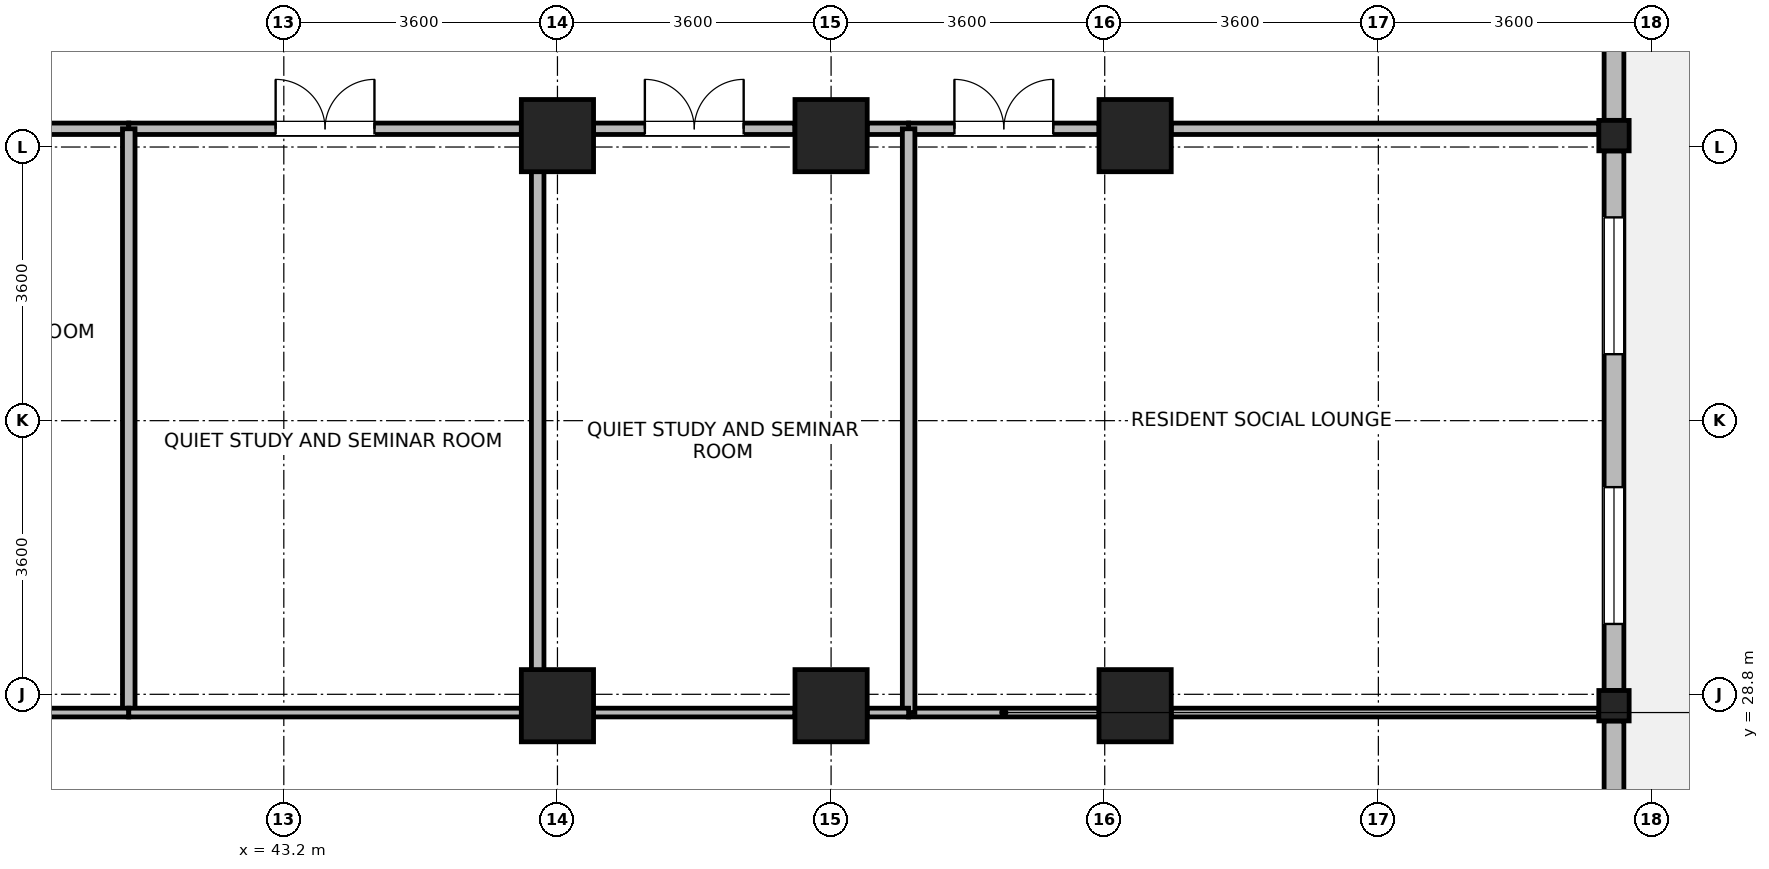
"""IFC4 building model, lengths in metres.
Left out: names, types, materials, properties, quantities, classifications, styles, units other than length and angle.
Written with IfcOpenShell. Run it as: python <this file> out.ifc"""

import sys

from ifc_helpers import new_model, si_unit, direction, frame, frame_2d, origin, origin_2d, place, context, subcontext, project, spatial, rectangle, i_section, extrude, source, transform, mapped, element, fill, save


model = new_model("IFC4")
c1 = context("Model", 3, precision=1e-05, world=origin(), true_north=direction((0.0, 1.0)))
c2 = subcontext(c1, "Body", "Model", "MODEL_VIEW")
j1 = project(units=[si_unit("LENGTHUNIT", "METRE"), si_unit("PLANEANGLEUNIT", "RADIAN")], contexts=[c1])
p1 = place(None, origin())
s1 = spatial("IfcSite", under=j1, at=p1, CompositionType="ELEMENT")
p2 = place(p1, origin())
s2 = spatial("IfcBuilding", under=s1, at=p2, CompositionType="ELEMENT")
p3 = place(p2, frame((0.0, 0.0, 216.6)))
s3 = spatial("IfcBuildingStorey", under=s2, at=p3, CompositionType="ELEMENT", Elevation=216.6)
m1 = source(origin(), c2, "Body", "SweptSolid", [
    extrude(rectangle(XDim=0.95, YDim=0.95, at=origin_2d()), origin(), (0.0, 0.0, 1.0), 3.7),
])
for number, where, z_axis, x_axis in (
    (1, (46.8, 28.65, 0.0), (0.0, 0.0, 1.0), (1.0, 0.0, 0.0)),
    (2, (46.8, 36.15, 0.0), (0.0, 0.0, 1.0), (1.0, 0.0, 0.0)),
    (3, (50.4, 28.65, 0.0), (0.0, 0.0, 1.0), (1.0, 0.0, 0.0)),
    (4, (50.4, 36.15, 0.0), (0.0, 0.0, 1.0), (1.0, 0.0, 0.0)),
    (5, (54.4, 28.65, 0.0), (0.0, 0.0, 1.0), (1.0, 0.0, 0.0)),
    (6, (54.4, 36.15, 0.0), (0.0, 0.0, 1.0), (1.0, 0.0, 0.0)),
):
    element("IfcColumn", number, at=place(p3, frame(where, z_axis=z_axis, x_axis=x_axis)), inside=s3, PredefinedType="COLUMN", context=c2, shape_type="MappedRepresentation", body=[
        mapped(m1, transform((0.0, 0.0, 0.0), x_axis=(1.0, 0.0, 0.0), y_axis=(0.0, 1.0, 0.0), z_axis=(0.0, 0.0, 1.0), scale=1.0)),
    ])
m2 = source(origin(), c2, "Body", "SweptSolid", [
    extrude(i_section(OverallWidth=0.399, OverallDepth=0.4, WebThickness=0.017, FlangeThickness=0.023, FilletRadius=0.015, at=origin_2d()), origin(), (0.0, 0.0, 1.0), 3.7),
])
for number, where, z_axis, x_axis in (
    (7, (60.7, 28.65, 0.0), (0.0, 0.0, 1.0), (1.0, 0.0, 0.0)),
    (8, (60.7, 36.15, 0.0), (0.0, 0.0, 1.0), (1.0, 0.0, 0.0)),
):
    element("IfcColumn", number, at=place(p3, frame(where, z_axis=z_axis, x_axis=x_axis)), inside=s3, PredefinedType="COLUMN", context=c2, shape_type="MappedRepresentation", body=[
        mapped(m2, transform((0.0, 0.0, 0.0), x_axis=(1.0, 0.0, 0.0), y_axis=(0.0, 1.0, 0.0), z_axis=(0.0, 0.0, 1.0), scale=1.0)),
    ])
p4 = place(p3, frame((60.7, 28.449, 0.0), z_axis=(0.0, 0.0, 1.0), x_axis=(0.0, -1.0, 0.0)))
e9 = element("IfcWall", 9, at=p4, inside=s3, PredefinedType="STANDARD", context=c2, shape_type="SweptSolid", body=[
    extrude(rectangle(XDim=6.648, YDim=0.26, at=frame_2d((3.324, 0.0))), origin(), (0.0, 0.0, 1.0), 3.05),
])
p5 = place(p4, frame((4.086, 0.0, 0.85)))
e10 = element("IfcOpeningElement", 10, at=p5, cuts=e9, PredefinedType="OPENING", context=c2, shape_type="SweptSolid", body=[
    extrude(rectangle(XDim=1.8, YDim=1.85, at=frame_2d((0.9, 0.925))), frame((0.0, 0.14, 0.0), z_axis=(0.0, -1.0, 0.0), x_axis=(1.0, 0.0, 0.0)), (0.0, 0.0, 1.0), 0.28),
])
p6 = place(p4, frame((2.317, 0.0, 0.85)))
e11 = element("IfcOpeningElement", 11, at=p6, cuts=e9, PredefinedType="OPENING", context=c2, shape_type="SweptSolid", body=[
    extrude(rectangle(XDim=0.95, YDim=1.75, at=frame_2d((0.475, 0.875))), frame((0.0, 0.14, 0.0), z_axis=(0.0, -1.0, 0.0), x_axis=(1.0, 0.0, 0.0)), (0.0, 0.0, 1.0), 0.28),
])
p7 = place(p3, frame((60.7, 35.949, 0.0), z_axis=(0.0, 0.0, 1.0), x_axis=(0.0, -1.0, 0.0)))
e12 = element("IfcWall", 12, at=p7, inside=s3, PredefinedType="STANDARD", context=c2, shape_type="SweptSolid", body=[
    extrude(rectangle(XDim=7.098, YDim=0.26, at=frame_2d((3.549, 0.0))), origin(), (0.0, 0.0, 1.0), 3.05),
])
p8 = place(p7, frame((0.875, 0.0, 0.85)))
e13 = element("IfcOpeningElement", 13, at=p8, cuts=e12, PredefinedType="OPENING", context=c2, shape_type="SweptSolid", body=[
    extrude(rectangle(XDim=1.8, YDim=1.85, at=frame_2d((0.9, 0.925))), frame((0.0, 0.14, 0.0), z_axis=(0.0, -1.0, 0.0), x_axis=(1.0, 0.0, 0.0)), (0.0, 0.0, 1.0), 0.28),
])
p9 = place(p7, frame((4.424, 0.0, 0.85)))
e14 = element("IfcOpeningElement", 14, at=p9, cuts=e12, PredefinedType="OPENING", context=c2, shape_type="SweptSolid", body=[
    extrude(rectangle(XDim=1.8, YDim=1.85, at=frame_2d((0.9, 0.925))), frame((0.0, 0.14, 0.0), z_axis=(0.0, -1.0, 0.0), x_axis=(1.0, 0.0, 0.0)), (0.0, 0.0, 1.0), 0.28),
])
p10 = place(p3, frame((60.7, 43.33, 0.0), z_axis=(0.0, 0.0, 1.0), x_axis=(0.0, -1.0, 0.0)))
e15 = element("IfcWall", 15, at=p10, inside=s3, PredefinedType="STANDARD", context=c2, shape_type="SweptSolid", body=[
    extrude(rectangle(XDim=6.979, YDim=0.26, at=frame_2d((3.49, 0.0))), origin(), (0.0, 0.0, 1.0), 3.45),
])
p11 = place(p10, frame((0.845, 0.0, 0.85)))
e16 = element("IfcOpeningElement", 16, at=p11, cuts=e15, PredefinedType="OPENING", context=c2, shape_type="SweptSolid", body=[
    extrude(rectangle(XDim=1.8, YDim=1.85, at=frame_2d((0.9, 0.925))), frame((0.0, 0.14, 0.0), z_axis=(0.0, -1.0, 0.0), x_axis=(1.0, 0.0, 0.0)), (0.0, 0.0, 1.0), 0.28),
])
p12 = place(p10, frame((3.014, 0.0, 0.85)))
e17 = element("IfcOpeningElement", 17, at=p12, cuts=e15, PredefinedType="OPENING", context=c2, shape_type="SweptSolid", body=[
    extrude(rectangle(XDim=0.95, YDim=1.75, at=frame_2d((0.475, 0.875))), frame((0.0, 0.14, 0.0), z_axis=(0.0, -1.0, 0.0), x_axis=(1.0, 0.0, 0.0)), (0.0, 0.0, 1.0), 0.28),
])
p13 = place(p3, frame((51.42, 36.24, 0.0), z_axis=(0.0, 0.0, 1.0), x_axis=(1.0, 0.0, 0.0)))
e18 = element("IfcWall", 18, at=p13, inside=s3, PredefinedType="PARTITIONING", context=c2, shape_type="SweptSolid", body=[
    extrude(rectangle(XDim=2.505, YDim=0.15, at=frame_2d((1.252, 0.0))), origin(), (0.0, 0.0, 1.0), 2.9),
])
p14 = place(p13, frame((0.603, 0.0, 0.0)))
e19 = element("IfcOpeningElement", 19, at=p14, cuts=e18, PredefinedType="OPENING", context=c2, shape_type="SweptSolid", body=[
    extrude(rectangle(XDim=1.3, YDim=2.12, at=frame_2d((0.65, 1.06))), frame((0.0, 0.085, 0.0), z_axis=(0.0, -1.0, 0.0), x_axis=(1.0, 0.0, 0.0)), (0.0, 0.0, 1.0), 0.17),
])
p15 = place(p3, frame((54.875, 36.24, 0.0), z_axis=(0.0, 0.0, 1.0), x_axis=(1.0, 0.0, 0.0)))
e20 = element("IfcWall", 20, at=p15, inside=s3, PredefinedType="PARTITIONING", context=c2, shape_type="SweptSolid", body=[
    extrude(rectangle(XDim=5.625, YDim=0.15, at=frame_2d((2.813, 0.0))), origin(), (0.0, 0.0, 1.0), 2.9),
])
p16 = place(p3, frame((36.475, 36.24, 0.0), z_axis=(0.0, 0.0, 1.0), x_axis=(1.0, 0.0, 0.0)))
e21 = element("IfcWall", 21, at=p16, inside=s3, PredefinedType="PARTITIONING", context=c2, shape_type="SweptSolid", body=[
    extrude(rectangle(XDim=4.685, YDim=0.15, at=frame_2d((2.342, 0.0))), origin(), (0.0, 0.0, 1.0), 2.9),
])
p17 = place(p3, frame((41.16, 36.24, 0.0), z_axis=(0.0, 0.0, 1.0), x_axis=(1.0, 0.0, 0.0)))
e22 = element("IfcWall", 22, at=p17, inside=s3, PredefinedType="PARTITIONING", context=c2, shape_type="SweptSolid", body=[
    extrude(rectangle(XDim=5.165, YDim=0.15, at=frame_2d((2.583, 0.0))), origin(), (0.0, 0.0, 1.0), 2.9),
])
p18 = place(p17, frame((1.933, 0.0, 0.0)))
e23 = element("IfcOpeningElement", 23, at=p18, cuts=e22, PredefinedType="OPENING", context=c2, shape_type="SweptSolid", body=[
    extrude(rectangle(XDim=1.3, YDim=2.12, at=frame_2d((0.65, 1.06))), frame((0.0, 0.085, 0.0), z_axis=(0.0, -1.0, 0.0), x_axis=(1.0, 0.0, 0.0)), (0.0, 0.0, 1.0), 0.17),
])
p19 = place(p3, frame((47.275, 36.24, 0.0), z_axis=(0.0, 0.0, 1.0), x_axis=(1.0, 0.0, 0.0)))
e24 = element("IfcWall", 24, at=p19, inside=s3, PredefinedType="PARTITIONING", context=c2, shape_type="SweptSolid", body=[
    extrude(rectangle(XDim=2.65, YDim=0.15, at=frame_2d((1.325, 0.0))), origin(), (0.0, 0.0, 1.0), 2.9),
])
p20 = place(p19, frame((0.675, 0.0, 0.0)))
e25 = element("IfcOpeningElement", 25, at=p20, cuts=e24, PredefinedType="OPENING", context=c2, shape_type="SweptSolid", body=[
    extrude(rectangle(XDim=1.3, YDim=2.12, at=frame_2d((0.65, 1.06))), frame((0.0, 0.085, 0.0), z_axis=(0.0, -1.0, 0.0), x_axis=(1.0, 0.0, 0.0)), (0.0, 0.0, 1.0), 0.17),
])
p21 = place(p3, frame((50.875, 36.24, 0.0), z_axis=(0.0, 0.0, 1.0), x_axis=(1.0, 0.0, 0.0)))
e26 = element("IfcWall", 26, at=p21, inside=s3, PredefinedType="PARTITIONING", context=c2, shape_type="SweptSolid", body=[
    extrude(rectangle(XDim=0.545, YDim=0.15, at=frame_2d((0.272, 0.0))), origin(), (0.0, 0.0, 1.0), 2.9),
])
p22 = place(p3, frame((51.42, 28.56, 0.0), z_axis=(0.0, 0.0, 1.0), x_axis=(1.0, 0.0, 0.0)))
e27 = element("IfcWall", 27, at=p22, inside=s3, PredefinedType="PARTITIONING", context=c2, shape_type="SweptSolid", body=[
    extrude(rectangle(XDim=2.505, YDim=0.115, at=frame_2d((1.252, 0.0))), origin(), (0.0, 0.0, 1.0), 2.9),
])
p23 = place(p3, frame((54.875, 28.56, 0.0), z_axis=(0.0, 0.0, 1.0), x_axis=(1.0, 0.0, 0.0)))
e28 = element("IfcWall", 28, at=p23, inside=s3, PredefinedType="PARTITIONING", context=c2, shape_type="SweptSolid", body=[
    extrude(rectangle(XDim=5.625, YDim=0.115, at=frame_2d((2.813, 0.0))), origin(), (0.0, 0.0, 1.0), 2.9),
])
for number, where, z_axis, x_axis in (
    (29, (41.16, 28.56, 0.0), (0.0, 0.0, 1.0), (0.0, 1.0, 0.0)),
    (30, (46.54, 28.56, 0.0), (0.0, 0.0, 1.0), (0.0, 1.0, 0.0)),
    (31, (51.42, 28.56, 0.0), (0.0, 0.0, 1.0), (0.0, 1.0, 0.0)),
):
    element("IfcWall", number, at=place(p3, frame(where, z_axis=z_axis, x_axis=x_axis)), inside=s3, PredefinedType="PARTITIONING", context=c2, shape_type="SweptSolid", body=[
        extrude(rectangle(XDim=7.68, YDim=0.165, at=frame_2d((3.84, 0.0))), origin(), (0.0, 0.0, 1.0), 3.45),
    ])
p24 = place(p3, frame((36.475, 28.56, 0.0), z_axis=(0.0, 0.0, 1.0), x_axis=(1.0, 0.0, 0.0)))
e32 = element("IfcWall", 32, at=p24, inside=s3, PredefinedType="PARTITIONING", context=c2, shape_type="SweptSolid", body=[
    extrude(rectangle(XDim=4.685, YDim=0.115, at=frame_2d((2.342, 0.0))), origin(), (0.0, 0.0, 1.0), 2.9),
])
p25 = place(p3, frame((41.16, 28.56, 0.0), z_axis=(0.0, 0.0, 1.0), x_axis=(1.0, 0.0, 0.0)))
e33 = element("IfcWall", 33, at=p25, inside=s3, PredefinedType="PARTITIONING", context=c2, shape_type="SweptSolid", body=[
    extrude(rectangle(XDim=5.165, YDim=0.115, at=frame_2d((2.583, 0.0))), origin(), (0.0, 0.0, 1.0), 2.9),
])
p26 = place(p3, frame((47.275, 28.56, 0.0), z_axis=(0.0, 0.0, 1.0), x_axis=(1.0, 0.0, 0.0)))
e34 = element("IfcWall", 34, at=p26, inside=s3, PredefinedType="PARTITIONING", context=c2, shape_type="SweptSolid", body=[
    extrude(rectangle(XDim=2.65, YDim=0.115, at=frame_2d((1.325, 0.0))), origin(), (0.0, 0.0, 1.0), 2.9),
])
p27 = place(p3, frame((50.875, 28.56, 0.0), z_axis=(0.0, 0.0, 1.0), x_axis=(1.0, 0.0, 0.0)))
e35 = element("IfcWall", 35, at=p27, inside=s3, PredefinedType="PARTITIONING", context=c2, shape_type="SweptSolid", body=[
    extrude(rectangle(XDim=0.545, YDim=0.115, at=frame_2d((0.272, 0.0))), origin(), (0.0, 0.0, 1.0), 2.9),
])
p28 = place(p8, origin())
e36 = element("IfcWindow", 36, at=p28, inside=s3, PartitioningType="SINGLE_PANEL", PredefinedType="WINDOW", context=c2, shape_type="SweptSolid", body=[
    extrude(rectangle(XDim=1.8, YDim=1.85, at=frame_2d((0.9, 0.925))), frame((0.0, 0.03, 0.0), z_axis=(0.0, -1.0, 0.0), x_axis=(1.0, 0.0, 0.0)), (0.0, 0.0, 1.0), 0.06),
])
fill(e13, e36)
p29 = place(p9, origin())
e37 = element("IfcWindow", 37, at=p29, inside=s3, PartitioningType="SINGLE_PANEL", PredefinedType="WINDOW", context=c2, shape_type="SweptSolid", body=[
    extrude(rectangle(XDim=1.8, YDim=1.85, at=frame_2d((0.9, 0.925))), frame((0.0, 0.03, 0.0), z_axis=(0.0, -1.0, 0.0), x_axis=(1.0, 0.0, 0.0)), (0.0, 0.0, 1.0), 0.06),
])
fill(e14, e37)
p30 = place(p14, origin())
e38 = element("IfcDoor", 38, at=p30, inside=s3, OperationType="DOUBLE_DOOR_SINGLE_SWING", PredefinedType="DOOR", context=c2, shape_type="SweptSolid", body=[
    extrude(rectangle(XDim=1.3, YDim=2.12, at=frame_2d((0.65, 1.06))), frame((0.0, 0.025, 0.0), z_axis=(0.0, -1.0, 0.0), x_axis=(1.0, 0.0, 0.0)), (0.0, 0.0, 1.0), 0.05),
])
fill(e19, e38)
p31 = place(p18, origin())
e39 = element("IfcDoor", 39, at=p31, inside=s3, OperationType="DOUBLE_DOOR_SINGLE_SWING", PredefinedType="DOOR", context=c2, shape_type="SweptSolid", body=[
    extrude(rectangle(XDim=1.3, YDim=2.12, at=frame_2d((0.65, 1.06))), frame((0.0, 0.025, 0.0), z_axis=(0.0, -1.0, 0.0), x_axis=(1.0, 0.0, 0.0)), (0.0, 0.0, 1.0), 0.05),
])
fill(e23, e39)
p32 = place(p20, origin())
e40 = element("IfcDoor", 40, at=p32, inside=s3, OperationType="DOUBLE_DOOR_SINGLE_SWING", PredefinedType="DOOR", context=c2, shape_type="SweptSolid", body=[
    extrude(rectangle(XDim=1.3, YDim=2.12, at=frame_2d((0.65, 1.06))), frame((0.0, 0.025, 0.0), z_axis=(0.0, -1.0, 0.0), x_axis=(1.0, 0.0, 0.0)), (0.0, 0.0, 1.0), 0.05),
])
fill(e25, e40)
save(model, sys.argv[1])
